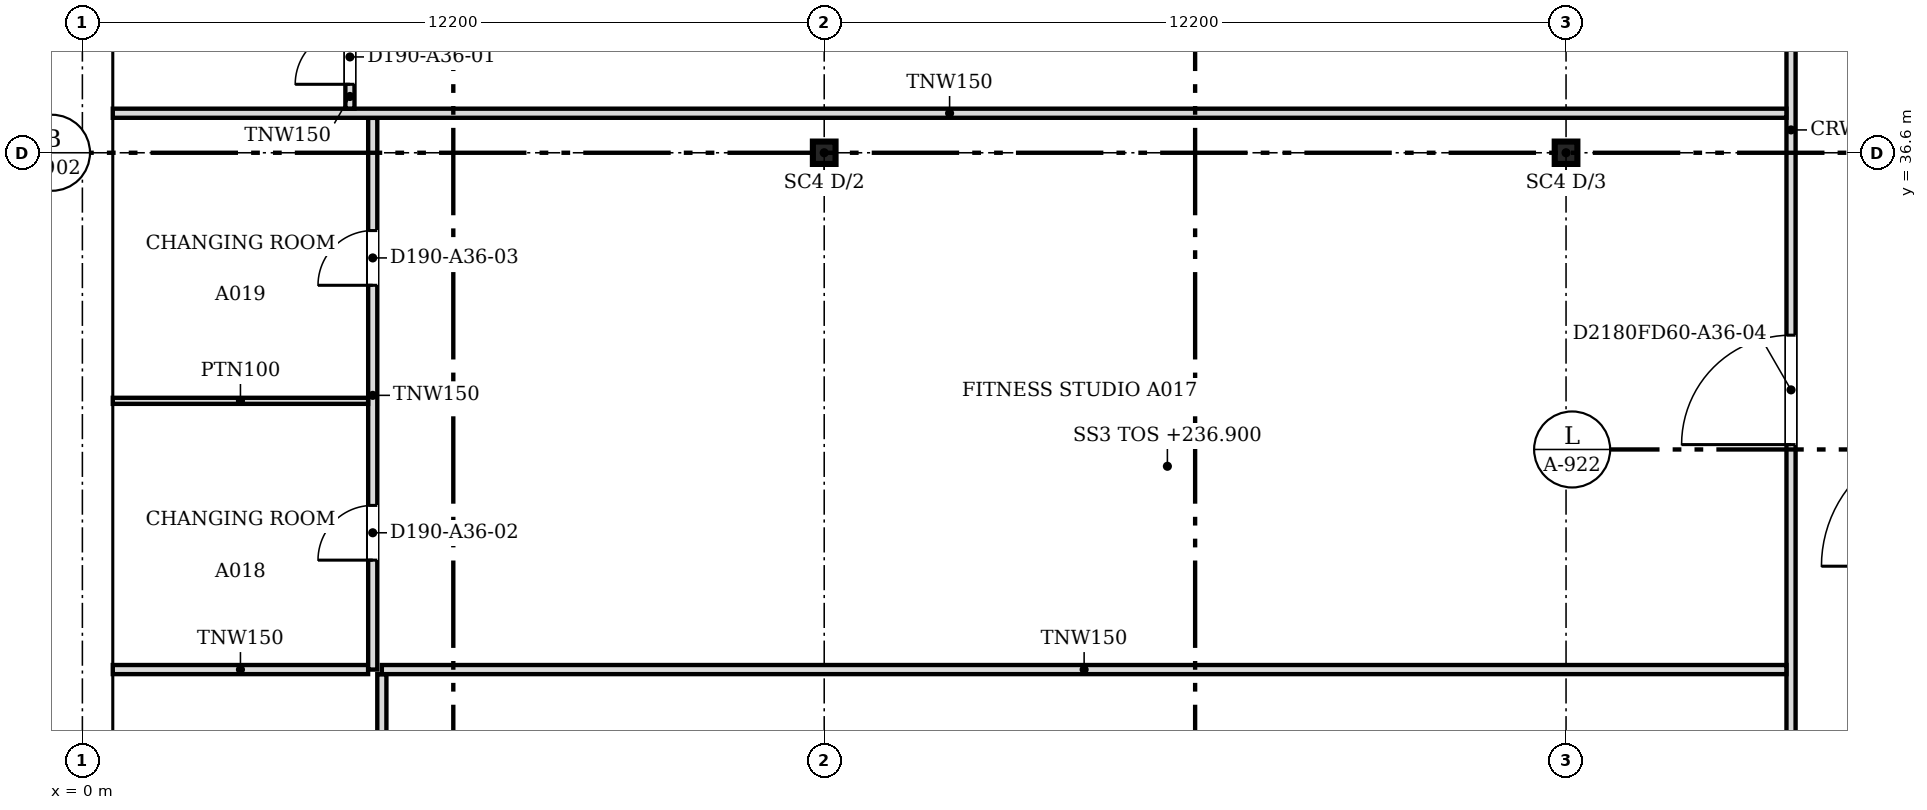
"""IFC4 building model, lengths in metres.
Left out: names, types, materials, properties, quantities, classifications, styles, units other than length and angle.
Written with IfcOpenShell. Run it as: python <this file> out.ifc"""

import sys

from ifc_helpers import new_model, si_unit, direction, frame, frame_2d, origin, origin_2d, place, context, subcontext, project, spatial, polyline, rectangle, i_section, outline, extrude, faceted_brep, source, transform, mapped, element, fill, save


model = new_model("IFC4")
c1 = context("Model", 3, precision=1e-05, world=origin(), true_north=direction((0.0, 1.0)))
c2 = subcontext(c1, "Body", "Model", "MODEL_VIEW")
j1 = project(units=[si_unit("LENGTHUNIT", "METRE"), si_unit("PLANEANGLEUNIT", "RADIAN")], contexts=[c1])
p1 = place(None, origin())
s1 = spatial("IfcSite", under=j1, at=p1, CompositionType="ELEMENT")
p2 = place(p1, origin())
s2 = spatial("IfcBuilding", under=s1, at=p2, CompositionType="ELEMENT")
p3 = place(p2, frame((0.0, 0.0, 236.9)))
s3 = spatial("IfcBuildingStorey", under=s2, at=p3, CompositionType="ELEMENT", Elevation=236.9)
for number, where, z_axis, x_axis in (
    (1, (12.2, 36.6, 0.0), (0.0, 0.0, 1.0), (1.0, 0.0, 0.0)),
    (2, (24.4, 36.6, 0.0), (0.0, 0.0, 1.0), (1.0, 0.0, 0.0)),
):
    element("IfcColumn", number, at=place(p3, frame(where, z_axis=z_axis, x_axis=x_axis)), inside=s3, PredefinedType="COLUMN", context=c2, shape_type="SweptSolid", body=[
        extrude(i_section(OverallWidth=0.373, OverallDepth=0.368, WebThickness=0.015, FlangeThickness=0.024, at=origin_2d()), origin(), (0.0, 0.0, 1.0), 3.6),
    ])
m1 = source(origin(), c2, "Body", "Brep", [
    faceted_brep([(6.1, -0.25, 0.0), (3.05, -0.25, 3.8), (0.0, -0.25, 0.0), (6.1, -0.25, 0.0), (0.0, 0.25, 0.0), (3.05, 0.25, 3.8), (6.1, 0.25, 0.0), (6.1, 0.25, 0.0)], [[[0, 1, 2, 3]], [[4, 5, 6, 7]], [[6, 5, 1, 0]], [[5, 4, 2, 1]], [[4, 7, 3, 2]], [[3, 7, 6, 0]]]),
])
p4 = place(p3, frame((0.25, 42.7, 0.0), z_axis=(0.0, 0.0, 1.0), x_axis=(0.0, -1.0, 0.0)))
e3 = element("IfcWall", 3, at=p4, inside=s3, PredefinedType="SOLIDWALL", context=c2, shape_type="MappedRepresentation", body=[
    mapped(m1, transform((0.0, 0.0, 0.0), scale=1.0)),
])
m2 = source(origin(), c2, "Body", "SweptSolid", [
    extrude(outline(polyline([(5.579, 0.25), (3.05, 3.401), (0.521, 0.25), (5.579, 0.25)])), frame((0.0, 0.26, 0.0), z_axis=(0.0, -1.0, 0.0), x_axis=(1.0, 0.0, 0.0)), (0.0, 0.0, 1.0), 0.52),
])
p5 = place(p4, origin())
e4 = element("IfcOpeningElement", 4, at=p5, cuts=e3, PredefinedType="OPENING", context=c2, shape_type="MappedRepresentation", body=[
    mapped(m2, transform((0.0, 0.0, 0.0), scale=1.0)),
])
m3 = source(origin(), c2, "Body", "SweptSolid", [
    extrude(outline(polyline([(6.1, 0.0), (3.05, 3.8), (0.0, 0.0), (6.1, 0.0)])), frame((0.0, 0.25, 0.0), z_axis=(0.0, -1.0, 0.0), x_axis=(1.0, 0.0, 0.0)), (0.0, 0.0, 1.0), 0.5),
])
p6 = place(p3, frame((0.25, 36.6, 0.0), z_axis=(0.0, 0.0, 1.0), x_axis=(0.0, -1.0, 0.0)))
e5 = element("IfcWall", 5, at=p6, inside=s3, PredefinedType="SOLIDWALL", context=c2, shape_type="MappedRepresentation", body=[
    mapped(m3, transform((0.0, 0.0, 0.0), scale=1.0)),
])
p7 = place(p6, origin())
e6 = element("IfcOpeningElement", 6, at=p7, cuts=e5, PredefinedType="OPENING", context=c2, shape_type="MappedRepresentation", body=[
    mapped(m2, transform((0.0, 0.0, 0.0), scale=1.0)),
])
m4 = source(origin(), c2, "Body", "Brep", [
    faceted_brep([(6.053, -0.25, 0.0), (3.05, -0.25, 3.8), (0.0, -0.25, 0.0), (0.0, 0.25, 0.0), (3.05, 0.25, 3.8), (6.007, 0.25, 0.059), (6.007, 0.25, 0.0), (6.053, 0.0, 0.0)], [[[0, 1, 2]], [[3, 4, 5, 6]], [[5, 4, 1, 0, 7]], [[4, 3, 2, 1]], [[3, 6, 7, 0, 2]], [[7, 6, 5]]]),
])
p8 = place(p3, frame((0.25, 30.5, 0.0), z_axis=(0.0, 0.0, 1.0), x_axis=(0.0, -1.0, 0.0)))
e7 = element("IfcWall", 7, at=p8, inside=s3, PredefinedType="SOLIDWALL", context=c2, shape_type="MappedRepresentation", body=[
    mapped(m4, transform((0.0, 0.0, 0.0), scale=1.0)),
])
m5 = source(origin(), c2, "Body", "SweptSolid", [
    extrude(outline(polyline([(5.537, 0.25), (3.049, 3.399), (0.521, 0.25), (5.537, 0.25)])), frame((0.0, 0.26, 0.0), z_axis=(0.0, -1.0, 0.0), x_axis=(1.0, 0.0, 0.0)), (0.0, 0.0, 1.0), 0.52),
])
p9 = place(p8, origin())
e8 = element("IfcOpeningElement", 8, at=p9, cuts=e7, PredefinedType="OPENING", context=c2, shape_type="MappedRepresentation", body=[
    mapped(m5, transform((0.0, 0.0, 0.0), scale=1.0)),
])
p10 = place(p2, frame((0.0, 0.0, 240.7)))
s4 = spatial("IfcBuildingStorey", under=s2, at=p10, CompositionType="ELEMENT", Elevation=240.7)
m6 = source(origin(), c2, "Body", "Brep", [
    faceted_brep([(3.05, -0.25, 0.0), (6.1, -0.25, 3.8), (6.1, -0.25, 3.8), (3.05, -0.25, 7.6), (0.0, -0.25, 3.8), (0.0, 0.25, 3.8), (3.05, 0.25, 7.6), (6.1, 0.25, 3.8), (6.1, 0.25, 3.8), (3.05, 0.25, 0.0)], [[[0, 1, 2, 3, 4]], [[5, 6, 7, 8, 9]], [[9, 8, 1, 0]], [[7, 6, 3, 2]], [[6, 5, 4, 3]], [[5, 9, 0, 4]], [[1, 8, 7, 2]]]),
])
p11 = place(p10, frame((0.25, 39.65, -3.8), z_axis=(0.0, 0.0, 1.0), x_axis=(0.0, -1.0, 0.0)))
e9 = element("IfcWall", 9, at=p11, inside=s4, PredefinedType="SOLIDWALL", context=c2, shape_type="MappedRepresentation", body=[
    mapped(m6, transform((0.0, 0.0, 0.0), scale=1.0)),
])
m7 = source(origin(), c2, "Body", "SweptSolid", [
    extrude(outline(polyline([(3.05, 0.399), (5.78, 3.8), (3.05, 7.201), (0.321, 3.8), (3.05, 0.399)])), frame((0.0, 0.26, 0.0), z_axis=(0.0, -1.0, 0.0), x_axis=(1.0, 0.0, 0.0)), (0.0, 0.0, 1.0), 0.52),
])
p12 = place(p11, origin())
e10 = element("IfcOpeningElement", 10, at=p12, cuts=e9, PredefinedType="OPENING", context=c2, shape_type="MappedRepresentation", body=[
    mapped(m7, transform((0.0, 0.0, 0.0), scale=1.0)),
])
m8 = source(origin(), c2, "Body", "SweptSolid", [
    extrude(outline(polyline([(3.05, 0.0), (6.1, 3.8), (3.05, 7.6), (0.0, 3.8), (3.05, 0.0)])), frame((0.0, 0.25, 0.0), z_axis=(0.0, -1.0, 0.0), x_axis=(1.0, 0.0, 0.0)), (0.0, 0.0, 1.0), 0.5),
])
p13 = place(p10, frame((0.25, 33.55, -3.8), z_axis=(0.0, 0.0, 1.0), x_axis=(0.0, -1.0, 0.0)))
e11 = element("IfcWall", 11, at=p13, inside=s4, PredefinedType="SOLIDWALL", context=c2, shape_type="MappedRepresentation", body=[
    mapped(m8, transform((0.0, 0.0, 0.0), scale=1.0)),
])
p14 = place(p13, origin())
e12 = element("IfcOpeningElement", 12, at=p14, cuts=e11, PredefinedType="OPENING", context=c2, shape_type="MappedRepresentation", body=[
    mapped(m7, transform((0.0, 0.0, 0.0), scale=1.0)),
])
m9 = source(origin(), c2, "Body", "Brep", [
    faceted_brep([(3.003, -0.25, 0.0), (3.05, -0.25, 0.06), (3.05, -0.25, 7.54), (3.003, -0.25, 7.6), (0.0, -0.25, 3.8), (0.0, 0.25, 3.8), (2.957, 0.25, 7.541), (2.957, 0.25, 0.059), (3.003, 0.0, 0.0), (3.003, 0.0, 7.6)], [[[0, 1, 2, 3, 4]], [[5, 6, 7]], [[1, 0, 8]], [[9, 3, 2]], [[6, 5, 4, 3, 9]], [[5, 7, 8, 0, 4]], [[1, 8, 7, 6, 9, 2]]]),
])
p15 = place(p10, frame((0.25, 27.45, -3.8), z_axis=(0.0, 0.0, 1.0), x_axis=(0.0, -1.0, 0.0)))
e13 = element("IfcWall", 13, at=p15, inside=s4, PredefinedType="SOLIDWALL", context=c2, shape_type="MappedRepresentation", body=[
    mapped(m9, transform((0.0, 0.0, 0.0), scale=1.0)),
])
m10 = source(origin(), c2, "Body", "SweptSolid", [
    extrude(outline(polyline([(2.803, 6.944), (0.319, 3.8), (2.803, 0.656), (2.803, 6.944)])), frame((0.0, 0.26, 0.0), z_axis=(0.0, -1.0, 0.0), x_axis=(1.0, 0.0, 0.0)), (0.0, 0.0, 1.0), 0.52),
])
p16 = place(p15, origin())
e14 = element("IfcOpeningElement", 14, at=p16, cuts=e13, PredefinedType="OPENING", context=c2, shape_type="MappedRepresentation", body=[
    mapped(m10, transform((0.0, 0.0, 0.0), scale=1.0)),
])
p17 = place(p3, frame((4.925, 22.0, 0.0), z_axis=(0.0, 0.0, 1.0), x_axis=(0.0, 1.0, 0.0)))
e15 = element("IfcWall", 15, at=p17, inside=s3, PredefinedType="PARTITIONING", context=c2, shape_type="SweptSolid", body=[
    extrude(rectangle(XDim=6.024, YDim=0.15, at=frame_2d((3.012, 0.0))), origin(), (0.0, 0.0, 1.0), 3.067),
])
m11 = source(origin(), c2, "Body", "SweptSolid", [
    extrude(rectangle(XDim=0.9, YDim=2.1, at=frame_2d((0.45, 1.05))), frame((0.0, 0.085, 0.0), z_axis=(0.0, -1.0, 0.0), x_axis=(1.0, 0.0, 0.0)), (0.0, 0.0, 1.0), 0.17),
])
p18 = place(p17, frame((2.6, 0.0, 0.0)))
e16 = element("IfcOpeningElement", 16, at=p18, cuts=e15, PredefinedType="OPENING", context=c2, shape_type="MappedRepresentation", body=[
    mapped(m11, transform((0.0, 0.0, 0.0), scale=1.0)),
])
p19 = place(p3, frame((28.1, 22.076, 0.0), z_axis=(0.0, 0.0, 1.0), x_axis=(0.0, 1.0, 0.0)))
e17 = element("IfcWall", 17, at=p19, inside=s3, PredefinedType="PARTITIONING", context=c2, shape_type="SweptSolid", body=[
    extrude(rectangle(XDim=23.148, YDim=0.15, at=frame_2d((11.574, 0.0))), origin(), (0.0, 0.0, 1.0), 3.067),
])
m12 = source(origin(), c2, "Body", "SweptSolid", [
    extrude(rectangle(XDim=1.8, YDim=2.1, at=frame_2d((0.9, 1.05))), frame((0.0, 0.085, 0.0), z_axis=(0.0, -1.0, 0.0), x_axis=(1.0, 0.0, 0.0)), (0.0, 0.0, 1.0), 0.17),
])
p20 = place(p19, frame((2.1, 0.0, 0.0)))
e18 = element("IfcOpeningElement", 18, at=p20, cuts=e17, PredefinedType="OPENING", context=c2, shape_type="MappedRepresentation", body=[
    mapped(m12, transform((0.0, 0.0, 0.0), scale=1.0)),
])
p21 = place(p19, frame((18.275, 0.0, 0.0)))
e19 = element("IfcOpeningElement", 19, at=p21, cuts=e17, PredefinedType="OPENING", context=c2, shape_type="MappedRepresentation", body=[
    mapped(m12, transform((0.0, 0.0, 0.0), scale=1.0)),
])
p22 = place(p19, frame((9.724, 0.0, 0.0)))
e20 = element("IfcOpeningElement", 20, at=p22, cuts=e17, PredefinedType="OPENING", context=c2, shape_type="MappedRepresentation", body=[
    mapped(m12, transform((0.0, 0.0, 0.0), scale=1.0)),
])
p23 = place(p3, frame((0.5, 28.1, 0.0), z_axis=(0.0, 0.0, 1.0), x_axis=(1.0, 0.0, 0.0)))
e21 = element("IfcWall", 21, at=p23, inside=s3, PredefinedType="PARTITIONING", context=c2, shape_type="SweptSolid", body=[
    extrude(rectangle(XDim=4.199, YDim=0.15, at=frame_2d((2.1, 0.0))), origin(), (0.0, 0.0, 1.0), 3.067),
])
p24 = place(p3, frame((4.775, 28.1, 0.0), z_axis=(0.0, 0.0, 1.0), x_axis=(0.0, 1.0, 0.0)))
e22 = element("IfcWall", 22, at=p24, inside=s3, PredefinedType="PARTITIONING", context=c2, shape_type="SweptSolid", body=[
    extrude(rectangle(XDim=9.074, YDim=0.15, at=frame_2d((4.537, 0.0))), origin(), (0.0, 0.0, 1.0), 3.067),
])
p25 = place(p24, frame((1.8, 0.0, 0.0)))
e23 = element("IfcOpeningElement", 23, at=p25, cuts=e22, PredefinedType="OPENING", context=c2, shape_type="MappedRepresentation", body=[
    mapped(m11, transform((0.0, 0.0, 0.0), scale=1.0)),
])
p26 = place(p24, frame((6.32, 0.0, 0.0)))
e24 = element("IfcOpeningElement", 24, at=p26, cuts=e22, PredefinedType="OPENING", context=c2, shape_type="MappedRepresentation", body=[
    mapped(m11, transform((0.0, 0.0, 0.0), scale=1.0)),
])
p27 = place(p3, frame((4.925, 28.1, 0.0), z_axis=(0.0, 0.0, 1.0), x_axis=(1.0, 0.0, 0.0)))
e25 = element("IfcWall", 25, at=p27, inside=s3, PredefinedType="PARTITIONING", context=c2, shape_type="SweptSolid", body=[
    extrude(rectangle(XDim=23.099, YDim=0.15, at=frame_2d((11.549, 0.0))), origin(), (0.0, 0.0, 1.0), 3.067),
])
p28 = place(p3, frame((0.5, 32.52, 0.0), z_axis=(0.0, 0.0, 1.0), x_axis=(1.0, 0.0, 0.0)))
e26 = element("IfcWall", 26, at=p28, inside=s3, PredefinedType="PARTITIONING", context=c2, shape_type="SweptSolid", body=[
    extrude(rectangle(XDim=4.199, YDim=0.1, at=frame_2d((2.1, 0.0))), origin(), (0.0, 0.0, 1.0), 3.067),
])
p29 = place(p3, frame((0.5, 37.25, 0.0), z_axis=(0.0, 0.0, 1.0), x_axis=(1.0, 0.0, 0.0)))
e27 = element("IfcWall", 27, at=p29, inside=s3, PredefinedType="PARTITIONING", context=c2, shape_type="SweptSolid", body=[
    extrude(rectangle(XDim=27.524, YDim=0.15, at=frame_2d((13.762, 0.0))), origin(), (0.0, 0.0, 1.0), 3.067),
])
p30 = place(p3, frame((4.4, 37.326, 0.0), z_axis=(0.0, 0.0, 1.0), x_axis=(0.0, 1.0, 0.0)))
e28 = element("IfcWall", 28, at=p30, inside=s3, PredefinedType="PARTITIONING", context=c2, shape_type="SweptSolid", body=[
    extrude(rectangle(XDim=1.674, YDim=0.15, at=frame_2d((0.837, 0.0))), origin(), (0.0, 0.0, 1.0), 3.067),
])
p31 = place(p30, frame((0.4, 0.0, 0.0)))
e29 = element("IfcOpeningElement", 29, at=p31, cuts=e28, PredefinedType="OPENING", context=c2, shape_type="MappedRepresentation", body=[
    mapped(m11, transform((0.0, 0.0, 0.0), scale=1.0)),
])
m13 = source(origin(), c2, "Body", "SweptSolid", [
    extrude(rectangle(XDim=0.9, YDim=2.1, at=frame_2d((0.45, 1.05))), frame((0.0, 0.025, 0.0), z_axis=(0.0, -1.0, 0.0), x_axis=(1.0, 0.0, 0.0)), (0.0, 0.0, 1.0), 0.05),
])
p32 = place(p31, origin())
e30 = element("IfcDoor", 30, at=p32, inside=s3, OperationType="SINGLE_SWING_LEFT", PredefinedType="DOOR", context=c2, shape_type="MappedRepresentation", body=[
    mapped(m13, transform((0.0, 0.0, 0.0), scale=1.0)),
])
fill(e29, e30)
p33 = place(p25, origin())
e31 = element("IfcDoor", 31, at=p33, inside=s3, OperationType="SINGLE_SWING_LEFT", PredefinedType="DOOR", context=c2, shape_type="MappedRepresentation", body=[
    mapped(m13, transform((0.0, 0.0, 0.0), scale=1.0)),
])
fill(e23, e31)
p34 = place(p26, origin())
e32 = element("IfcDoor", 32, at=p34, inside=s3, OperationType="SINGLE_SWING_LEFT", PredefinedType="DOOR", context=c2, shape_type="MappedRepresentation", body=[
    mapped(m13, transform((0.0, 0.0, 0.0), scale=1.0)),
])
fill(e24, e32)
m14 = source(origin(), c2, "Body", "SweptSolid", [
    extrude(rectangle(XDim=1.8, YDim=2.1, at=frame_2d((0.9, 1.05))), frame((0.0, 0.025, 0.0), z_axis=(0.0, -1.0, 0.0), x_axis=(1.0, 0.0, 0.0)), (0.0, 0.0, 1.0), 0.05),
])
p35 = place(p22, origin())
e33 = element("IfcDoor", 33, at=p35, inside=s3, OperationType="DOUBLE_DOOR_SINGLE_SWING", PredefinedType="DOOR", context=c2, shape_type="MappedRepresentation", body=[
    mapped(m14, transform((0.0, 0.0, 0.0), scale=1.0)),
])
fill(e20, e33)
save(model, sys.argv[1])
